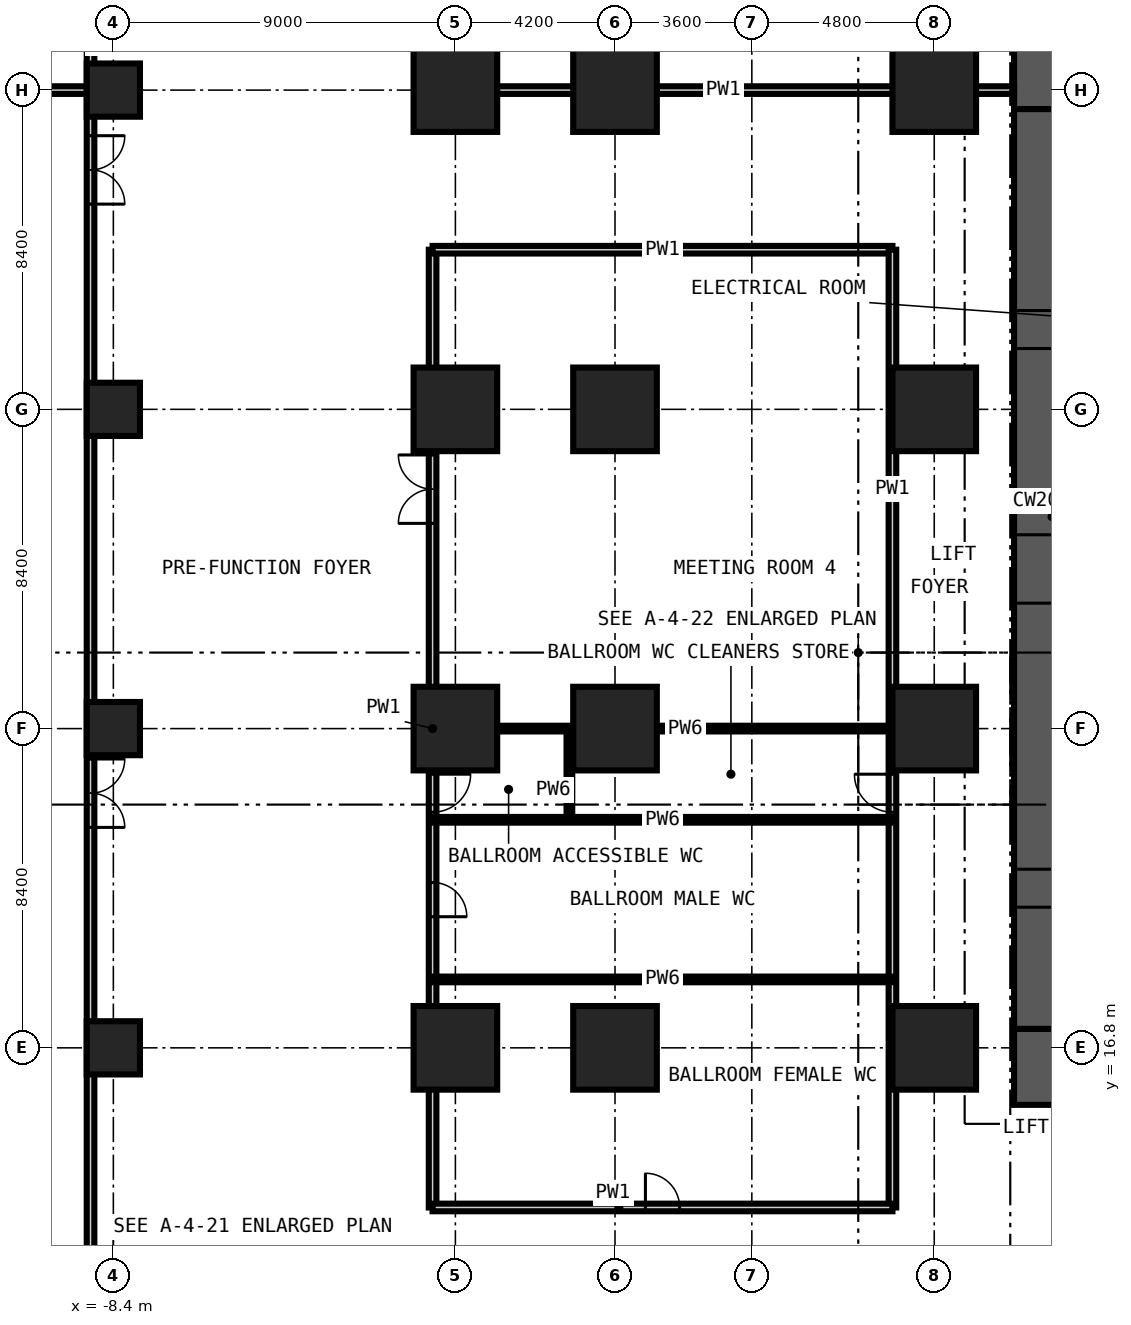
"""IFC4 building model, lengths in metres.
Left out: names, types, materials, properties, quantities, classifications, styles, units other than length and angle.
Written with IfcOpenShell. Run it as: python <this file> out.ifc"""

import sys

from ifc_helpers import new_model, si_unit, direction, frame, frame_2d, origin, origin_2d, place, context, subcontext, project, spatial, rectangle, extrude, element, fill, save


model = new_model("IFC4")
c1 = context("Model", 3, precision=1e-05, world=origin(), true_north=direction((0.0, 1.0)))
c2 = subcontext(c1, "Body", "Model", "MODEL_VIEW")
j1 = project(units=[si_unit("LENGTHUNIT", "METRE"), si_unit("PLANEANGLEUNIT", "RADIAN")], contexts=[c1])
p1 = place(None, origin())
s1 = spatial("IfcSite", under=j1, at=p1, CompositionType="ELEMENT")
p2 = place(p1, origin())
s2 = spatial("IfcBuilding", under=s1, at=p2, CompositionType="ELEMENT")
p3 = place(p2, frame((0.0, 0.0, 6.0)))
s3 = spatial("IfcBuildingStorey", under=s2, at=p3, CompositionType="ELEMENT", Elevation=6.0)
for number, where, z_axis, x_axis in (
    (1, (0.6, 16.8, -0.3), (0.0, 0.0, 1.0), (1.0, 0.0, 0.0)),
    (2, (0.6, 25.2, -0.3), (0.0, 0.0, 1.0), (1.0, 0.0, 0.0)),
    (3, (0.6, 33.6, -0.3), (0.0, 0.0, 1.0), (1.0, 0.0, 0.0)),
    (4, (0.6, 42.0, -0.3), (0.0, 0.0, 1.0), (1.0, 0.0, 0.0)),
    (5, (4.8, 16.8, -0.3), (0.0, 0.0, 1.0), (1.0, 0.0, 0.0)),
    (6, (4.8, 25.2, -0.3), (0.0, 0.0, 1.0), (1.0, 0.0, 0.0)),
    (7, (4.8, 33.6, -0.3), (0.0, 0.0, 1.0), (1.0, 0.0, 0.0)),
    (8, (4.8, 42.0, -0.3), (0.0, 0.0, 1.0), (1.0, 0.0, 0.0)),
    (9, (13.2, 16.8, -0.3), (0.0, 0.0, 1.0), (1.0, 0.0, 0.0)),
    (10, (13.2, 25.2, -0.3), (0.0, 0.0, 1.0), (1.0, 0.0, 0.0)),
    (11, (13.2, 33.6, -0.3), (0.0, 0.0, 1.0), (1.0, 0.0, 0.0)),
    (12, (13.2, 42.0, -0.3), (0.0, 0.0, 1.0), (1.0, 0.0, 0.0)),
):
    element("IfcColumn", number, at=place(p3, frame(where, z_axis=z_axis, x_axis=x_axis)), inside=s3, PredefinedType="COLUMN", context=c2, shape_type="SweptSolid", body=[
        extrude(rectangle(XDim=2.2, YDim=2.2, at=origin_2d()), origin(), (0.0, 0.0, 1.0), 6.0),
    ])
for number, where, z_axis, x_axis in (
    (13, (-8.4, 16.8, -0.3), (0.0, 0.0, 1.0), (1.0, 0.0, 0.0)),
    (14, (-8.4, 25.2, -0.3), (0.0, 0.0, 1.0), (1.0, 0.0, 0.0)),
    (15, (-8.4, 33.6, -0.3), (0.0, 0.0, 1.0), (1.0, 0.0, 0.0)),
    (16, (-8.4, 42.0, -0.3), (0.0, 0.0, 1.0), (1.0, 0.0, 0.0)),
):
    element("IfcColumn", number, at=place(p3, frame(where, z_axis=z_axis, x_axis=x_axis)), inside=s3, PredefinedType="COLUMN", context=c2, shape_type="SweptSolid", body=[
        extrude(rectangle(XDim=1.4, YDim=1.4, at=origin_2d()), origin(), (0.0, 0.0, 1.0), 6.0),
    ])
p4 = place(p3, frame((15.3, 16.3, -0.3), z_axis=(0.0, 0.0, 1.0), x_axis=(1.0, 0.0, 0.0)))
e17 = element("IfcWall", 17, at=p4, inside=s3, PredefinedType="SHEAR", context=c2, shape_type="SweptSolid", body=[
    extrude(rectangle(XDim=28.2, YDim=2.0, at=frame_2d((14.1, 0.0))), origin(), (0.0, 0.0, 1.0), 6.0),
])
p5 = place(p4, frame((13.6, 0.0, 0.3)))
e18 = element("IfcOpeningElement", 18, at=p5, cuts=e17, PredefinedType="OPENING", context=c2, shape_type="SweptSolid", body=[
    extrude(rectangle(XDim=1.0, YDim=2.1, at=frame_2d((0.5, 1.05))), frame((0.0, 1.01, 0.0), z_axis=(0.0, -1.0, 0.0), x_axis=(1.0, 0.0, 0.0)), (0.0, 0.0, 1.0), 2.02),
])
p6 = place(p4, frame((19.9, 0.0, 0.3)))
e19 = element("IfcOpeningElement", 19, at=p6, cuts=e17, PredefinedType="OPENING", context=c2, shape_type="SweptSolid", body=[
    extrude(rectangle(XDim=1.0, YDim=2.1, at=frame_2d((0.5, 1.05))), frame((0.0, 1.01, 0.0), z_axis=(0.0, -1.0, 0.0), x_axis=(1.0, 0.0, 0.0)), (0.0, 0.0, 1.0), 2.02),
])
p7 = place(p3, frame((43.5, 42.5, -0.3), z_axis=(0.0, 0.0, 1.0), x_axis=(-1.0, 0.0, 0.0)))
e20 = element("IfcWall", 20, at=p7, inside=s3, PredefinedType="SHEAR", context=c2, shape_type="SweptSolid", body=[
    extrude(rectangle(XDim=28.2, YDim=2.0, at=frame_2d((14.1, 0.0))), origin(), (0.0, 0.0, 1.0), 6.0),
])
p8 = place(p7, frame((21.4, 0.0, 0.3)))
e21 = element("IfcOpeningElement", 21, at=p8, cuts=e20, PredefinedType="OPENING", context=c2, shape_type="SweptSolid", body=[
    extrude(rectangle(XDim=1.0, YDim=2.1, at=frame_2d((0.5, 1.05))), frame((0.0, 1.01, 0.0), z_axis=(0.0, -1.0, 0.0), x_axis=(1.0, 0.0, 0.0)), (0.0, 0.0, 1.0), 2.02),
])
p9 = place(p7, frame((11.4, 0.0, 0.3)))
e22 = element("IfcOpeningElement", 22, at=p9, cuts=e20, PredefinedType="OPENING", context=c2, shape_type="SweptSolid", body=[
    extrude(rectangle(XDim=1.2, YDim=2.2, at=frame_2d((0.6, 1.1))), frame((0.0, 1.01, 0.0), z_axis=(0.0, -1.0, 0.0), x_axis=(1.0, 0.0, 0.0)), (0.0, 0.0, 1.0), 2.02),
])
p10 = place(p3, frame((16.3, 41.5, -0.3), z_axis=(0.0, 0.0, 1.0), x_axis=(0.0, -1.0, 0.0)))
e23 = element("IfcWall", 23, at=p10, inside=s3, PredefinedType="SHEAR", context=c2, shape_type="SweptSolid", body=[
    extrude(rectangle(XDim=24.2, YDim=2.0, at=frame_2d((12.1, 0.0))), origin(), (0.0, 0.0, 1.0), 6.0),
])
p11 = place(p10, frame((11.2, 0.0, 0.3)))
e24 = element("IfcOpeningElement", 24, at=p11, cuts=e23, PredefinedType="OPENING", context=c2, shape_type="SweptSolid", body=[
    extrude(rectangle(XDim=1.8, YDim=2.2, at=frame_2d((0.9, 1.1))), frame((0.0, 1.01, 0.0), z_axis=(0.0, -1.0, 0.0), x_axis=(1.0, 0.0, 0.0)), (0.0, 0.0, 1.0), 2.02),
])
p12 = place(p10, frame((20.0, 0.0, 0.3)))
e25 = element("IfcOpeningElement", 25, at=p12, cuts=e23, PredefinedType="OPENING", context=c2, shape_type="SweptSolid", body=[
    extrude(rectangle(XDim=1.0, YDim=2.1, at=frame_2d((0.5, 1.05))), frame((0.0, 1.01, 0.0), z_axis=(0.0, -1.0, 0.0), x_axis=(1.0, 0.0, 0.0)), (0.0, 0.0, 1.0), 2.02),
])
p13 = place(p10, frame((5.3, 0.0, 0.3)))
e26 = element("IfcOpeningElement", 26, at=p13, cuts=e23, PredefinedType="OPENING", context=c2, shape_type="SweptSolid", body=[
    extrude(rectangle(XDim=1.0, YDim=2.1, at=frame_2d((0.5, 1.05))), frame((0.0, 1.01, 0.0), z_axis=(0.0, -1.0, 0.0), x_axis=(1.0, 0.0, 0.0)), (0.0, 0.0, 1.0), 2.02),
])
p14 = place(p3, frame((-9.0, 42.0, 0.0), z_axis=(0.0, 0.0, 1.0), x_axis=(0.0, 1.0, 0.0)))
e27 = element("IfcWall", 27, at=p14, inside=s3, PredefinedType="PARTITIONING", context=c2, shape_type="SweptSolid", body=[
    extrude(rectangle(XDim=2.4, YDim=0.2, at=frame_2d((1.2, 0.0))), origin(), (0.0, 0.0, 1.0), 5.7),
])
p15 = place(p3, frame((0.0, 12.6, 0.0), z_axis=(0.0, 0.0, 1.0), x_axis=(0.0, 1.0, 0.0)))
e28 = element("IfcWall", 28, at=p15, inside=s3, PredefinedType="PARTITIONING", context=c2, shape_type="SweptSolid", body=[
    extrude(rectangle(XDim=25.2, YDim=0.2, at=frame_2d((12.6, 0.0))), origin(), (0.0, 0.0, 1.0), 5.7),
])
p16 = place(p15, frame((7.65, 0.0, 0.0)))
e29 = element("IfcOpeningElement", 29, at=p16, cuts=e28, PredefinedType="OPENING", context=c2, shape_type="SweptSolid", body=[
    extrude(rectangle(XDim=0.9, YDim=2.1, at=frame_2d((0.45, 1.05))), frame((0.0, 0.11, 0.0), z_axis=(0.0, -1.0, 0.0), x_axis=(1.0, 0.0, 0.0)), (0.0, 0.0, 1.0), 0.22),
])
p17 = place(p15, frame((10.4, 0.0, 0.0)))
e30 = element("IfcOpeningElement", 30, at=p17, cuts=e28, PredefinedType="OPENING", context=c2, shape_type="SweptSolid", body=[
    extrude(rectangle(XDim=1.0, YDim=2.1, at=frame_2d((0.5, 1.05))), frame((0.0, 0.11, 0.0), z_axis=(0.0, -1.0, 0.0), x_axis=(1.0, 0.0, 0.0)), (0.0, 0.0, 1.0), 0.22),
])
p18 = place(p15, frame((18.0, 0.0, 0.0)))
e31 = element("IfcOpeningElement", 31, at=p18, cuts=e28, PredefinedType="OPENING", context=c2, shape_type="SweptSolid", body=[
    extrude(rectangle(XDim=1.8, YDim=2.4, at=frame_2d((0.9, 1.2))), frame((0.0, 0.11, 0.0), z_axis=(0.0, -1.0, 0.0), x_axis=(1.0, 0.0, 0.0)), (0.0, 0.0, 1.0), 0.22),
])
p19 = place(p3, frame((0.0, 42.0, 0.0), z_axis=(0.0, 0.0, 1.0), x_axis=(0.0, 1.0, 0.0)))
e32 = element("IfcWall", 32, at=p19, inside=s3, PredefinedType="PARTITIONING", context=c2, shape_type="SweptSolid", body=[
    extrude(rectangle(XDim=16.8, YDim=0.2, at=frame_2d((8.4, 0.0))), origin(), (0.0, 0.0, 1.0), 5.7),
])
p20 = place(p19, frame((9.6, 0.0, 0.0)))
e33 = element("IfcOpeningElement", 33, at=p20, cuts=e32, PredefinedType="OPENING", context=c2, shape_type="SweptSolid", body=[
    extrude(rectangle(XDim=1.8, YDim=2.4, at=frame_2d((0.9, 1.2))), frame((0.0, 0.11, 0.0), z_axis=(0.0, -1.0, 0.0), x_axis=(1.0, 0.0, 0.0)), (0.0, 0.0, 1.0), 0.22),
])
p21 = place(p3, frame((12.1, 12.6, 0.0), z_axis=(0.0, 0.0, 1.0), x_axis=(0.0, 1.0, 0.0)))
e34 = element("IfcWall", 34, at=p21, inside=s3, PredefinedType="PARTITIONING", context=c2, shape_type="SweptSolid", body=[
    extrude(rectangle(XDim=12.6, YDim=0.2, at=frame_2d((6.3, 0.0))), origin(), (0.0, 0.0, 1.0), 5.7),
])
p22 = place(p21, frame((10.4, 0.0, 0.0)))
e35 = element("IfcOpeningElement", 35, at=p22, cuts=e34, PredefinedType="OPENING", context=c2, shape_type="SweptSolid", body=[
    extrude(rectangle(XDim=1.0, YDim=2.1, at=frame_2d((0.5, 1.05))), frame((0.0, 0.11, 0.0), z_axis=(0.0, -1.0, 0.0), x_axis=(1.0, 0.0, 0.0)), (0.0, 0.0, 1.0), 0.22),
])
p23 = place(p3, frame((0.0, 12.6, 0.0), z_axis=(0.0, 0.0, 1.0), x_axis=(1.0, 0.0, 0.0)))
e36 = element("IfcWall", 36, at=p23, inside=s3, PredefinedType="PARTITIONING", context=c2, shape_type="SweptSolid", body=[
    extrude(rectangle(XDim=12.1, YDim=0.2, at=frame_2d((6.05, 0.0))), origin(), (0.0, 0.0, 1.0), 5.7),
])
p24 = place(p23, frame((5.6, 0.0, 0.0)))
e37 = element("IfcOpeningElement", 37, at=p24, cuts=e36, PredefinedType="OPENING", context=c2, shape_type="SweptSolid", body=[
    extrude(rectangle(XDim=0.9, YDim=2.1, at=frame_2d((0.45, 1.05))), frame((0.0, 0.11, 0.0), z_axis=(0.0, -1.0, 0.0), x_axis=(1.0, 0.0, 0.0)), (0.0, 0.0, 1.0), 0.22),
])
p25 = place(p3, frame((0.0, 37.8, 0.0), z_axis=(0.0, 0.0, 1.0), x_axis=(1.0, 0.0, 0.0)))
e38 = element("IfcWall", 38, at=p25, inside=s3, PredefinedType="PARTITIONING", context=c2, shape_type="SweptSolid", body=[
    extrude(rectangle(XDim=12.1, YDim=0.2, at=frame_2d((6.05, 0.0))), origin(), (0.0, 0.0, 1.0), 5.7),
])
p26 = place(p3, frame((-33.6, 42.0, 0.0), z_axis=(0.0, 0.0, 1.0), x_axis=(1.0, 0.0, 0.0)))
e39 = element("IfcWall", 39, at=p26, inside=s3, PredefinedType="PARTITIONING", context=c2, shape_type="SweptSolid", body=[
    extrude(rectangle(XDim=24.6, YDim=0.2, at=frame_2d((12.3, 0.0))), origin(), (0.0, 0.0, 1.0), 5.7),
])
p27 = place(p26, frame((5.25, 0.0, 0.0)))
e40 = element("IfcOpeningElement", 40, at=p27, cuts=e39, PredefinedType="OPENING", context=c2, shape_type="SweptSolid", body=[
    extrude(rectangle(XDim=1.8, YDim=2.4, at=frame_2d((0.9, 1.2))), frame((0.0, 0.11, 0.0), z_axis=(0.0, -1.0, 0.0), x_axis=(1.0, 0.0, 0.0)), (0.0, 0.0, 1.0), 0.22),
])
p28 = place(p26, frame((17.55, 0.0, 0.0)))
e41 = element("IfcOpeningElement", 41, at=p28, cuts=e39, PredefinedType="OPENING", context=c2, shape_type="SweptSolid", body=[
    extrude(rectangle(XDim=1.8, YDim=2.4, at=frame_2d((0.9, 1.2))), frame((0.0, 0.11, 0.0), z_axis=(0.0, -1.0, 0.0), x_axis=(1.0, 0.0, 0.0)), (0.0, 0.0, 1.0), 0.22),
])
p29 = place(p3, frame((-9.0, 42.0, 0.0), z_axis=(0.0, 0.0, 1.0), x_axis=(0.0, -1.0, 0.0)))
e42 = element("IfcWall", 42, at=p29, inside=s3, PredefinedType="PARTITIONING", context=c2, shape_type="SweptSolid", body=[
    extrude(rectangle(XDim=33.6, YDim=0.2, at=frame_2d((16.8, 0.0))), origin(), (0.0, 0.0, 1.0), 5.7),
])
p30 = place(p29, frame((17.6, 0.0, 0.0)))
e43 = element("IfcOpeningElement", 43, at=p30, cuts=e42, PredefinedType="OPENING", context=c2, shape_type="SweptSolid", body=[
    extrude(rectangle(XDim=1.8, YDim=2.4, at=frame_2d((0.9, 1.2))), frame((0.0, 0.11, 0.0), z_axis=(0.0, -1.0, 0.0), x_axis=(1.0, 0.0, 0.0)), (0.0, 0.0, 1.0), 0.22),
])
p31 = place(p29, frame((1.2, 0.0, 0.0)))
e44 = element("IfcOpeningElement", 44, at=p31, cuts=e42, PredefinedType="OPENING", context=c2, shape_type="SweptSolid", body=[
    extrude(rectangle(XDim=1.8, YDim=2.4, at=frame_2d((0.9, 1.2))), frame((0.0, 0.11, 0.0), z_axis=(0.0, -1.0, 0.0), x_axis=(1.0, 0.0, 0.0)), (0.0, 0.0, 1.0), 0.22),
])
p32 = place(p29, frame((30.6, 0.0, 0.0)))
e45 = element("IfcOpeningElement", 45, at=p32, cuts=e42, PredefinedType="OPENING", context=c2, shape_type="SweptSolid", body=[
    extrude(rectangle(XDim=1.8, YDim=2.4, at=frame_2d((0.9, 1.2))), frame((0.0, 0.11, 0.0), z_axis=(0.0, -1.0, 0.0), x_axis=(1.0, 0.0, 0.0)), (0.0, 0.0, 1.0), 0.22),
])
p33 = place(p3, frame((12.1, 37.8, 0.0), z_axis=(0.0, 0.0, 1.0), x_axis=(0.0, -1.0, 0.0)))
e46 = element("IfcWall", 46, at=p33, inside=s3, PredefinedType="PARTITIONING", context=c2, shape_type="SweptSolid", body=[
    extrude(rectangle(XDim=12.6, YDim=0.2, at=frame_2d((6.3, 0.0))), origin(), (0.0, 0.0, 1.0), 5.7),
])
p34 = place(p3, frame((15.3, 42.0, 0.0), z_axis=(0.0, 0.0, 1.0), x_axis=(-1.0, 0.0, 0.0)))
e47 = element("IfcWall", 47, at=p34, inside=s3, PredefinedType="PARTITIONING", context=c2, shape_type="SweptSolid", body=[
    extrude(rectangle(XDim=15.3, YDim=0.2, at=frame_2d((7.65, 0.0))), origin(), (0.0, 0.0, 1.0), 5.7),
])
p35 = place(p3, frame((3.6, 22.8, 0.0), z_axis=(0.0, 0.0, 1.0), x_axis=(0.0, 1.0, 0.0)))
e48 = element("IfcWall", 48, at=p35, inside=s3, PredefinedType="PARTITIONING", context=c2, shape_type="SweptSolid", body=[
    extrude(rectangle(XDim=2.4, YDim=0.15, at=frame_2d((1.2, 0.0))), origin(), (0.0, 0.0, 1.0), 5.7),
])
for number, where, z_axis, x_axis in (
    (49, (0.0, 18.6, 0.0), (0.0, 0.0, 1.0), (1.0, 0.0, 0.0)),
    (50, (0.0, 22.8, 0.0), (0.0, 0.0, 1.0), (1.0, 0.0, 0.0)),
    (51, (0.0, 25.2, 0.0), (0.0, 0.0, 1.0), (1.0, 0.0, 0.0)),
):
    element("IfcWall", number, at=place(p3, frame(where, z_axis=z_axis, x_axis=x_axis)), inside=s3, PredefinedType="PARTITIONING", context=c2, shape_type="SweptSolid", body=[
        extrude(rectangle(XDim=12.1, YDim=0.15, at=frame_2d((6.05, 0.0))), origin(), (0.0, 0.0, 1.0), 5.7),
    ])
p36 = place(p11, origin())
e52 = element("IfcDoor", 52, at=p36, inside=s3, OperationType="DOUBLE_DOOR_DOUBLE_SWING", PredefinedType="DOOR", context=c2, shape_type="SweptSolid", body=[
    extrude(rectangle(XDim=1.8, YDim=2.2, at=frame_2d((0.9, 1.1))), frame((0.0, 0.025, 0.0), z_axis=(0.0, -1.0, 0.0), x_axis=(1.0, 0.0, 0.0)), (0.0, 0.0, 1.0), 0.05),
])
fill(e24, e52)
p37 = place(p12, origin())
e53 = element("IfcDoor", 53, at=p37, inside=s3, OperationType="SINGLE_SWING_LEFT", PredefinedType="DOOR", context=c2, shape_type="SweptSolid", body=[
    extrude(rectangle(XDim=1.0, YDim=2.1, at=frame_2d((0.5, 1.05))), frame((0.0, 0.025, 0.0), z_axis=(0.0, -1.0, 0.0), x_axis=(1.0, 0.0, 0.0)), (0.0, 0.0, 1.0), 0.05),
])
fill(e25, e53)
p38 = place(p13, origin())
e54 = element("IfcDoor", 54, at=p38, inside=s3, OperationType="SINGLE_SWING_RIGHT", PredefinedType="DOOR", context=c2, shape_type="SweptSolid", body=[
    extrude(rectangle(XDim=1.0, YDim=2.1, at=frame_2d((0.5, 1.05))), frame((0.0, 0.025, 0.0), z_axis=(0.0, -1.0, 0.0), x_axis=(1.0, 0.0, 0.0)), (0.0, 0.0, 1.0), 0.05),
])
fill(e26, e54)
p39 = place(p30, origin())
e55 = element("IfcDoor", 55, at=p39, inside=s3, OperationType="DOUBLE_DOOR_DOUBLE_SWING", PredefinedType="DOOR", context=c2, shape_type="SweptSolid", body=[
    extrude(rectangle(XDim=1.8, YDim=2.4, at=frame_2d((0.9, 1.2))), frame((0.0, 0.025, 0.0), z_axis=(0.0, -1.0, 0.0), x_axis=(1.0, 0.0, 0.0)), (0.0, 0.0, 1.0), 0.05),
])
fill(e43, e55)
p40 = place(p31, origin())
e56 = element("IfcDoor", 56, at=p40, inside=s3, OperationType="DOUBLE_DOOR_DOUBLE_SWING", PredefinedType="DOOR", context=c2, shape_type="SweptSolid", body=[
    extrude(rectangle(XDim=1.8, YDim=2.4, at=frame_2d((0.9, 1.2))), frame((0.0, 0.025, 0.0), z_axis=(0.0, -1.0, 0.0), x_axis=(1.0, 0.0, 0.0)), (0.0, 0.0, 1.0), 0.05),
])
fill(e44, e56)
p41 = place(p24, origin())
e57 = element("IfcDoor", 57, at=p41, inside=s3, OperationType="SINGLE_SWING_LEFT", PredefinedType="DOOR", context=c2, shape_type="SweptSolid", body=[
    extrude(rectangle(XDim=0.9, YDim=2.1, at=frame_2d((0.45, 1.05))), frame((0.0, 0.025, 0.0), z_axis=(0.0, -1.0, 0.0), x_axis=(1.0, 0.0, 0.0)), (0.0, 0.0, 1.0), 0.05),
])
fill(e37, e57)
p42 = place(p16, frame((0.9, 0.0, 0.0), z_axis=(0.0, 0.0, 1.0), x_axis=(-1.0, 0.0, 0.0)))
e58 = element("IfcDoor", 58, at=p42, inside=s3, OperationType="SINGLE_SWING_RIGHT", PredefinedType="DOOR", context=c2, shape_type="SweptSolid", body=[
    extrude(rectangle(XDim=0.9, YDim=2.1, at=frame_2d((0.45, 1.05))), frame((0.0, 0.025, 0.0), z_axis=(0.0, -1.0, 0.0), x_axis=(1.0, 0.0, 0.0)), (0.0, 0.0, 1.0), 0.05),
])
fill(e29, e58)
p43 = place(p17, frame((1.0, 0.0, 0.0), z_axis=(0.0, 0.0, 1.0), x_axis=(-1.0, 0.0, 0.0)))
e59 = element("IfcDoor", 59, at=p43, inside=s3, OperationType="SINGLE_SWING_LEFT", PredefinedType="DOOR", context=c2, shape_type="SweptSolid", body=[
    extrude(rectangle(XDim=1.0, YDim=2.1, at=frame_2d((0.5, 1.05))), frame((0.0, 0.025, 0.0), z_axis=(0.0, -1.0, 0.0), x_axis=(1.0, 0.0, 0.0)), (0.0, 0.0, 1.0), 0.05),
])
fill(e30, e59)
p44 = place(p22, origin())
e60 = element("IfcDoor", 60, at=p44, inside=s3, OperationType="SINGLE_SWING_RIGHT", PredefinedType="DOOR", context=c2, shape_type="SweptSolid", body=[
    extrude(rectangle(XDim=1.0, YDim=2.1, at=frame_2d((0.5, 1.05))), frame((0.0, 0.025, 0.0), z_axis=(0.0, -1.0, 0.0), x_axis=(1.0, 0.0, 0.0)), (0.0, 0.0, 1.0), 0.05),
])
fill(e35, e60)
p45 = place(p18, origin())
e61 = element("IfcDoor", 61, at=p45, inside=s3, OperationType="DOUBLE_DOOR_DOUBLE_SWING", PredefinedType="DOOR", context=c2, shape_type="SweptSolid", body=[
    extrude(rectangle(XDim=1.8, YDim=2.4, at=frame_2d((0.9, 1.2))), frame((0.0, 0.025, 0.0), z_axis=(0.0, -1.0, 0.0), x_axis=(1.0, 0.0, 0.0)), (0.0, 0.0, 1.0), 0.05),
])
fill(e31, e61)
save(model, sys.argv[1])
